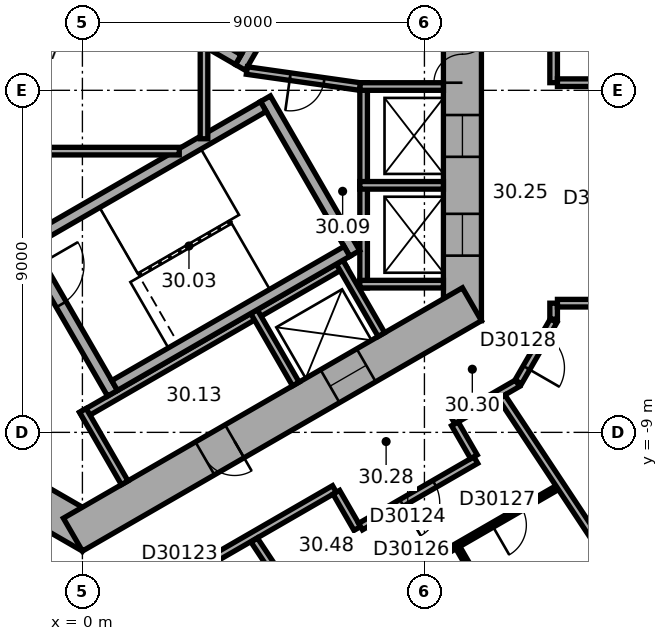
"""IFC4 building model, lengths in metres.
Left out: names, types, materials, properties, quantities, classifications, styles, units other than length and angle.
Written with IfcOpenShell. Run it as: python <this file> out.ifc"""

import sys

from ifc_helpers import new_model, si_unit, direction, frame, frame_2d, origin, place, context, subcontext, project, spatial, rectangle, extrude, element, fill, save


model = new_model("IFC4")
c1 = context("Model", 3, precision=1e-05, world=origin(), true_north=direction((0.0, 1.0)))
c2 = subcontext(c1, "Body", "Model", "MODEL_VIEW")
j1 = project(units=[si_unit("LENGTHUNIT", "METRE"), si_unit("PLANEANGLEUNIT", "RADIAN")], contexts=[c1])
p1 = place(None, origin())
s1 = spatial("IfcSite", under=j1, at=p1, CompositionType="ELEMENT")
p2 = place(p1, origin())
s2 = spatial("IfcBuilding", under=s1, at=p2, CompositionType="ELEMENT")
p3 = place(p2, frame((0.0, 0.0, 124.4)))
s3 = spatial("IfcBuildingStorey", under=s2, at=p3, CompositionType="ELEMENT", Elevation=124.4)
p4 = place(p3, frame((10.0, -6.062, 0.0), z_axis=(0.0, 0.0, 1.0), x_axis=(0.0, 1.0, 0.0)))
e1 = element("IfcWall", 1, at=p4, inside=s3, PredefinedType="SHEAR", context=c2, shape_type="SweptSolid", body=[
    extrude(rectangle(XDim=12.125, YDim=1.0, at=frame_2d((6.062, 0.0))), origin(), (0.0, 0.0, 1.0), 3.7),
])
p5 = place(p4, frame((6.262, 0.0, 0.0)))
e2 = element("IfcOpeningElement", 2, at=p5, cuts=e1, PredefinedType="OPENING", context=c2, shape_type="SweptSolid", body=[
    extrude(rectangle(XDim=1.5, YDim=2.1, at=frame_2d((0.75, 1.05))), frame((0.0, 0.51, 0.0), z_axis=(0.0, -1.0, 0.0), x_axis=(1.0, 0.0, 0.0)), (0.0, 0.0, 1.0), 1.02),
])
p6 = place(p4, frame((1.712, 0.0, 0.0)))
e3 = element("IfcOpeningElement", 3, at=p6, cuts=e1, PredefinedType="OPENING", context=c2, shape_type="SweptSolid", body=[
    extrude(rectangle(XDim=1.1, YDim=2.1, at=frame_2d((0.55, 1.05))), frame((0.0, 0.51, 0.0), z_axis=(0.0, -1.0, 0.0), x_axis=(1.0, 0.0, 0.0)), (0.0, 0.0, 1.0), 1.02),
])
p7 = place(p4, frame((4.312, 0.0, 0.0)))
e4 = element("IfcOpeningElement", 4, at=p7, cuts=e1, PredefinedType="OPENING", context=c2, shape_type="SweptSolid", body=[
    extrude(rectangle(XDim=1.1, YDim=2.1, at=frame_2d((0.55, 1.05))), frame((0.0, 0.51, 0.0), z_axis=(0.0, -1.0, 0.0), x_axis=(1.0, 0.0, 0.0)), (0.0, 0.0, 1.0), 1.02),
])
p8 = place(p3, frame((-10.25, -5.629, 0.0), z_axis=(0.0, 0.0, 1.0), x_axis=(0.866022616891, -0.50000482701, 0.0)))
e5 = element("IfcWall", 5, at=p8, inside=s3, PredefinedType="SHEAR", context=c2, shape_type="SweptSolid", body=[
    extrude(rectangle(XDim=12.125, YDim=1.0, at=frame_2d((6.062, 0.0))), origin(), (0.0, 0.0, 1.0), 3.7),
])
p9 = place(p8, frame((6.262, 0.0, 0.0)))
e6 = element("IfcOpeningElement", 6, at=p9, cuts=e5, PredefinedType="OPENING", context=c2, shape_type="SweptSolid", body=[
    extrude(rectangle(XDim=1.5, YDim=2.1, at=frame_2d((0.75, 1.05))), frame((0.0, 0.51, 0.0), z_axis=(0.0, -1.0, 0.0), x_axis=(1.0, 0.0, 0.0)), (0.0, 0.0, 1.0), 1.02),
])
p10 = place(p8, frame((1.812, 0.0, 0.0)))
e7 = element("IfcOpeningElement", 7, at=p10, cuts=e5, PredefinedType="OPENING", context=c2, shape_type="SweptSolid", body=[
    extrude(rectangle(XDim=0.9, YDim=2.1, at=frame_2d((0.45, 1.05))), frame((0.0, 0.51, 0.0), z_axis=(0.0, -1.0, 0.0), x_axis=(1.0, 0.0, 0.0)), (0.0, 0.0, 1.0), 1.02),
])
p11 = place(p8, frame((4.412, 0.0, 0.0)))
e8 = element("IfcOpeningElement", 8, at=p11, cuts=e5, PredefinedType="OPENING", context=c2, shape_type="SweptSolid", body=[
    extrude(rectangle(XDim=0.9, YDim=2.1, at=frame_2d((0.45, 1.05))), frame((0.0, 0.51, 0.0), z_axis=(0.0, -1.0, 0.0), x_axis=(1.0, 0.0, 0.0)), (0.0, 0.0, 1.0), 1.02),
])
p12 = place(p3, frame((-0.25, -11.691, 0.0), z_axis=(0.0, 0.0, 1.0), x_axis=(0.866022616891, 0.50000482701, 0.0)))
e9 = element("IfcWall", 9, at=p12, inside=s3, PredefinedType="SHEAR", context=c2, shape_type="SweptSolid", body=[
    extrude(rectangle(XDim=12.125, YDim=1.0, at=frame_2d((6.062, 0.0))), origin(), (0.0, 0.0, 1.0), 3.7),
])
p13 = place(p12, frame((4.012, 0.0, 0.0)))
e10 = element("IfcOpeningElement", 10, at=p13, cuts=e9, PredefinedType="OPENING", context=c2, shape_type="SweptSolid", body=[
    extrude(rectangle(XDim=0.9, YDim=2.1, at=frame_2d((0.45, 1.05))), frame((0.0, 0.51, 0.0), z_axis=(0.0, -1.0, 0.0), x_axis=(1.0, 0.0, 0.0)), (0.0, 0.0, 1.0), 1.02),
])
p14 = place(p12, frame((7.812, 0.0, 0.0)))
e11 = element("IfcOpeningElement", 11, at=p14, cuts=e9, PredefinedType="OPENING", context=c2, shape_type="SweptSolid", body=[
    extrude(rectangle(XDim=1.1, YDim=2.1, at=frame_2d((0.55, 1.05))), frame((0.0, 0.51, 0.0), z_axis=(0.0, -1.0, 0.0), x_axis=(1.0, 0.0, 0.0)), (0.0, 0.0, 1.0), 1.02),
])
p15 = place(p3, frame((7.4, -5.2, 0.0), z_axis=(0.0, 0.0, 1.0), x_axis=(0.0, 1.0, 0.0)))
e12 = element("IfcWall", 12, at=p15, inside=s3, PredefinedType="PARTITIONING", context=c2, shape_type="SweptSolid", body=[
    extrude(rectangle(XDim=5.4, YDim=0.2, at=frame_2d((2.7, 0.0))), origin(), (0.0, 0.0, 1.0), 3.42),
])
for number, where, z_axis, x_axis in (
    (13, (7.3, -5.1, 0.0), (0.0, 0.0, 1.0), (1.0, 0.0, 0.0)),
    (14, (7.3, -2.5, 0.0), (0.0, 0.0, 1.0), (1.0, 0.0, 0.0)),
    (15, (7.3, 0.1, 0.0), (0.0, 0.0, 1.0), (1.0, 0.0, 0.0)),
):
    element("IfcWall", number, at=place(p3, frame(where, z_axis=z_axis, x_axis=x_axis)), inside=s3, PredefinedType="PARTITIONING", context=c2, shape_type="SweptSolid", body=[
        extrude(rectangle(XDim=2.2, YDim=0.2, at=frame_2d((1.1, 0.0))), origin(), (0.0, 0.0, 1.0), 3.42),
    ])
p16 = place(p3, frame((-0.024, -8.559, 0.0), z_axis=(0.0, 0.0, 1.0), x_axis=(0.866026010844, 0.49999894854, 0.0)))
e16 = element("IfcWall", 16, at=p16, inside=s3, PredefinedType="PARTITIONING", context=c2, shape_type="SweptSolid", body=[
    extrude(rectangle(XDim=8.0, YDim=0.2, at=frame_2d((4.0, 0.0))), origin(), (0.0, 0.0, 1.0), 3.42),
])
for number, where, z_axis, x_axis in (
    (17, (0.013, -8.422, 0.0), (0.0, 0.0, 1.0), (0.5, -0.866, 0.0)),
    (18, (4.516, -5.822, 0.0), (0.0, 0.0, 1.0), (0.5, -0.866, 0.0)),
    (19, (6.768, -4.522, 0.0), (0.0, 0.0, 1.0), (0.5, -0.866, 0.0)),
):
    element("IfcWall", number, at=place(p3, frame(where, z_axis=z_axis, x_axis=x_axis)), inside=s3, PredefinedType="PARTITIONING", context=c2, shape_type="SweptSolid", body=[
        extrude(rectangle(XDim=2.2, YDim=0.2, at=frame_2d((1.1, 0.0))), origin(), (0.0, 0.0, 1.0), 3.42),
    ])
p17 = place(p3, frame((4.158, 0.602, 0.0), z_axis=(0.0, 0.0, 1.0), x_axis=(0.499977259774, 0.866038532462, 0.0)))
e20 = element("IfcWall", 20, at=p17, inside=s3, PredefinedType="SHEAR", context=c2, shape_type="SweptSolid", body=[
    extrude(rectangle(XDim=4.7, YDim=0.3, at=frame_2d((2.35, 0.0))), origin(), (0.0, 0.0, 1.0), 3.42),
])
p18 = place(p17, frame((0.8, 0.0, 0.0)))
e21 = element("IfcOpeningElement", 21, at=p18, cuts=e20, PredefinedType="OPENING", context=c2, shape_type="SweptSolid", body=[
    extrude(rectangle(XDim=1.2, YDim=2.1, at=frame_2d((0.6, 1.05))), frame((0.0, 0.16, 0.0), z_axis=(0.0, -1.0, 0.0), x_axis=(1.0, 0.0, 0.0)), (0.0, 0.0, 1.0), 0.32),
])
p19 = place(p3, frame((4.103, 0.807, 0.0), z_axis=(0.0, 0.0, 1.0), x_axis=(-0.866027801685, 0.499995846692, 0.0)))
e22 = element("IfcWall", 22, at=p19, inside=s3, PredefinedType="SHEAR", context=c2, shape_type="SweptSolid", body=[
    extrude(rectangle(XDim=7.06, YDim=0.3, at=frame_2d((3.53, 0.0))), origin(), (0.0, 0.0, 1.0), 3.42),
])
p20 = place(p3, frame((-1.558, -3.902, 0.0), z_axis=(0.0, 0.0, 1.0), x_axis=(0.499977259774, -0.866038532462, 0.0)))
e23 = element("IfcWall", 23, at=p20, inside=s3, PredefinedType="SHEAR", context=c2, shape_type="SweptSolid", body=[
    extrude(rectangle(XDim=4.7, YDim=0.3, at=frame_2d((2.35, 0.0))), origin(), (0.0, 0.0, 1.0), 3.42),
])
p21 = place(p20, frame((0.8, 0.0, 0.0)))
e24 = element("IfcOpeningElement", 24, at=p21, cuts=e23, PredefinedType="OPENING", context=c2, shape_type="SweptSolid", body=[
    extrude(rectangle(XDim=1.2, YDim=2.1, at=frame_2d((0.6, 1.05))), frame((0.0, 0.16, 0.0), z_axis=(0.0, -1.0, 0.0), x_axis=(1.0, 0.0, 0.0)), (0.0, 0.0, 1.0), 0.32),
])
p22 = place(p3, frame((4.816, -0.222, 0.0), z_axis=(0.0, 0.0, 1.0), x_axis=(0.499977259774, -0.866038532462, 0.0)))
e25 = element("IfcWall", 25, at=p22, inside=s3, PredefinedType="SHEAR", context=c2, shape_type="SweptSolid", body=[
    extrude(rectangle(XDim=4.7, YDim=0.3, at=frame_2d((2.35, 0.0))), origin(), (0.0, 0.0, 1.0), 3.42),
])
for number, where, z_axis, x_axis in (
    (26, (-1.353, -3.957, 0.0), (0.0, 0.0, 1.0), (0.866, 0.5, 0.0)),
    (27, (0.847, -7.767, 0.0), (0.0, 0.0, 1.0), (0.866, 0.5, 0.0)),
):
    element("IfcWall", number, at=place(p3, frame(where, z_axis=z_axis, x_axis=x_axis)), inside=s3, PredefinedType="SHEAR", context=c2, shape_type="SweptSolid", body=[
        extrude(rectangle(XDim=7.06, YDim=0.3, at=frame_2d((3.53, 0.0))), origin(), (0.0, 0.0, 1.0), 3.42),
    ])
p23 = place(p3, frame((4.327, 0.521, 0.0), z_axis=(0.0, 0.0, 1.0), x_axis=(0.990124376366, -0.14019172346, 0.0)))
e28 = element("IfcWall", 28, at=p23, inside=s3, PredefinedType="PARTITIONING", context=c2, shape_type="SweptSolid", body=[
    extrude(rectangle(XDim=3.002, YDim=0.2, at=frame_2d((1.501, 0.0))), origin(), (0.0, 0.0, 1.0), 3.42),
])
p24 = place(p23, frame((1.15, 0.0, 0.0)))
e29 = element("IfcOpeningElement", 29, at=p24, cuts=e28, PredefinedType="OPENING", context=c2, shape_type="SweptSolid", body=[
    extrude(rectangle(XDim=0.9, YDim=2.1, at=frame_2d((0.45, 1.05))), frame((0.0, 0.11, 0.0), z_axis=(0.0, -1.0, 0.0), x_axis=(1.0, 0.0, 0.0)), (0.0, 0.0, 1.0), 0.22),
])
p25 = place(p3, frame((-2.72, -1.6, 0.0), z_axis=(0.0, 0.0, 1.0), x_axis=(1.0, 0.0, 0.0)))
e30 = element("IfcWall", 30, at=p25, inside=s3, PredefinedType="PARTITIONING", context=c2, shape_type="SweptSolid", body=[
    extrude(rectangle(XDim=5.269, YDim=0.2, at=frame_2d((2.634, 0.0))), origin(), (0.0, 0.0, 1.0), 3.42),
])
p26 = place(p3, frame((3.2, -1.275, 0.0), z_axis=(0.0, 0.0, 1.0), x_axis=(0.0, 1.0, 0.0)))
e31 = element("IfcWall", 31, at=p26, inside=s3, PredefinedType="PARTITIONING", context=c2, shape_type="SweptSolid", body=[
    extrude(rectangle(XDim=2.549, YDim=0.2, at=frame_2d((1.275, 0.0))), origin(), (0.0, 0.0, 1.0), 3.42),
])
p27 = place(p3, frame((1.204, -13.623, 0.0), z_axis=(0.0, 0.0, 1.0), x_axis=(0.866031867142, 0.49998880497, 0.0)))
e32 = element("IfcWall", 32, at=p27, inside=s3, PredefinedType="PARTITIONING", context=c2, shape_type="SweptSolid", body=[
    extrude(rectangle(XDim=6.268, YDim=0.2, at=frame_2d((3.134, 0.0))), origin(), (0.0, 0.0, 1.0), 3.42),
])
p28 = place(p27, frame((1.381, 0.0, 0.0)))
e33 = element("IfcOpeningElement", 33, at=p28, cuts=e32, PredefinedType="OPENING", context=c2, shape_type="SweptSolid", body=[
    extrude(rectangle(XDim=1.0, YDim=2.1, at=frame_2d((0.5, 1.05))), frame((0.0, 0.11, 0.0), z_axis=(0.0, -1.0, 0.0), x_axis=(1.0, 0.0, 0.0)), (0.0, 0.0, 1.0), 0.22),
])
p29 = place(p3, frame((6.152, -14.116, 0.0), z_axis=(0.0, 0.0, 1.0), x_axis=(0.866026788224, 0.499997602072, 0.0)))
e34 = element("IfcWall", 34, at=p29, inside=s3, PredefinedType="PARTITIONING", context=c2, shape_type="SweptSolid", body=[
    extrude(rectangle(XDim=7.322, YDim=0.12, at=frame_2d((3.661, 0.0))), origin(), (0.0, 0.0, 1.0), 3.42),
])
p30 = place(p29, frame((0.55, 0.0, 0.0)))
e35 = element("IfcOpeningElement", 35, at=p30, cuts=e34, PredefinedType="OPENING", context=c2, shape_type="SweptSolid", body=[
    extrude(rectangle(XDim=1.0, YDim=2.1, at=frame_2d((0.5, 1.05))), frame((0.0, 0.07, 0.0), z_axis=(0.0, -1.0, 0.0), x_axis=(1.0, 0.0, 0.0)), (0.0, 0.0, 1.0), 0.14),
])
p31 = place(p29, frame((2.736, 0.0, 0.0)))
e36 = element("IfcOpeningElement", 36, at=p31, cuts=e34, PredefinedType="OPENING", context=c2, shape_type="SweptSolid", body=[
    extrude(rectangle(XDim=0.9, YDim=2.1, at=frame_2d((0.45, 1.05))), frame((0.0, 0.07, 0.0), z_axis=(0.0, -1.0, 0.0), x_axis=(1.0, 0.0, 0.0)), (0.0, 0.0, 1.0), 0.14),
])
p32 = place(p29, frame((5.347, 0.0, 0.0)))
e37 = element("IfcOpeningElement", 37, at=p32, cuts=e34, PredefinedType="OPENING", context=c2, shape_type="SweptSolid", body=[
    extrude(rectangle(XDim=0.9, YDim=2.1, at=frame_2d((0.45, 1.05))), frame((0.0, 0.07, 0.0), z_axis=(0.0, -1.0, 0.0), x_axis=(1.0, 0.0, 0.0)), (0.0, 0.0, 1.0), 0.14),
])
p33 = place(p3, frame((6.682, -10.576, 0.0), z_axis=(0.0, 0.0, 1.0), x_axis=(0.499978356969, -0.866037899034, 0.0)))
e38 = element("IfcWall", 38, at=p33, inside=s3, PredefinedType="PARTITIONING", context=c2, shape_type="SweptSolid", body=[
    extrude(rectangle(XDim=1.101, YDim=0.2, at=frame_2d((0.551, 0.0))), origin(), (0.0, 0.0, 1.0), 3.42),
])
p34 = place(p3, frame((7.319, -11.479, 0.0), z_axis=(0.0, 0.0, 1.0), x_axis=(0.866038154057, 0.49997791523, 0.0)))
e39 = element("IfcWall", 39, at=p34, inside=s3, PredefinedType="PARTITIONING", context=c2, shape_type="SweptSolid", body=[
    extrude(rectangle(XDim=3.502, YDim=0.2, at=frame_2d((1.751, 0.0))), origin(), (0.0, 0.0, 1.0), 3.42),
])
p35 = place(p34, frame((1.251, 0.0, 0.0)))
e40 = element("IfcOpeningElement", 40, at=p35, cuts=e39, PredefinedType="OPENING", context=c2, shape_type="SweptSolid", body=[
    extrude(rectangle(XDim=1.0, YDim=2.1, at=frame_2d((0.5, 1.05))), frame((0.0, 0.11, 0.0), z_axis=(0.0, -1.0, 0.0), x_axis=(1.0, 0.0, 0.0)), (0.0, 0.0, 1.0), 0.22),
])
p36 = place(p3, frame((9.15, -18.827, 0.0), z_axis=(0.0, 0.0, 1.0), x_axis=(-0.551942527453, 0.833882153777, 0.0)))
e41 = element("IfcWall", 41, at=p36, inside=s3, PredefinedType="PARTITIONING", context=c2, shape_type="SweptSolid", body=[
    extrude(rectangle(XDim=8.386, YDim=0.2, at=frame_2d((4.193, 0.0))), origin(), (0.0, 0.0, 1.0), 2.87),
])
p37 = place(p3, frame((9.752, -8.688, 0.0), z_axis=(0.0, 0.0, 1.0), x_axis=(0.865974105138, 0.500088841337, 0.0)))
e42 = element("IfcWall", 42, at=p37, inside=s3, PredefinedType="PARTITIONING", context=c2, shape_type="SweptSolid", body=[
    extrude(rectangle(XDim=1.961, YDim=0.2, at=frame_2d((0.98, 0.0))), origin(), (0.0, 0.0, 1.0), 3.42),
])
p38 = place(p3, frame((10.302, -9.642, 0.0), z_axis=(0.0, 0.0, 1.0), x_axis=(-0.500074377092, 0.865982457891, 0.0)))
e43 = element("IfcWall", 43, at=p38, inside=s3, PredefinedType="PARTITIONING", context=c2, shape_type="SweptSolid", body=[
    extrude(rectangle(XDim=1.001, YDim=0.2, at=frame_2d((0.5, 0.0))), origin(), (0.0, 0.0, 1.0), 3.42),
])
p39 = place(p3, frame((11.47, -7.673, 0.0), z_axis=(0.0, 0.0, 1.0), x_axis=(0.499964847546, 0.866045698112, 0.0)))
e44 = element("IfcWall", 44, at=p39, inside=s3, PredefinedType="PARTITIONING", context=c2, shape_type="SweptSolid", body=[
    extrude(rectangle(XDim=1.86, YDim=0.2, at=frame_2d((0.93, 0.0))), origin(), (0.0, 0.0, 1.0), 3.42),
])
p40 = place(p39, frame((0.43, 0.0, 0.0)))
e45 = element("IfcOpeningElement", 45, at=p40, cuts=e44, PredefinedType="OPENING", context=c2, shape_type="SweptSolid", body=[
    extrude(rectangle(XDim=1.0, YDim=2.1, at=frame_2d((0.5, 1.05))), frame((0.0, 0.11, 0.0), z_axis=(0.0, -1.0, 0.0), x_axis=(1.0, 0.0, 0.0)), (0.0, 0.0, 1.0), 0.22),
])
p41 = place(p3, frame((12.4, -6.022, 0.0), z_axis=(0.0, 0.0, 1.0), x_axis=(0.0, 1.0, 0.0)))
e46 = element("IfcWall", 46, at=p41, inside=s3, PredefinedType="PARTITIONING", context=c2, shape_type="SweptSolid", body=[
    extrude(rectangle(XDim=0.421, YDim=0.2, at=frame_2d((0.21, 0.0))), origin(), (0.0, 0.0, 1.0), 3.42),
])
p42 = place(p3, frame((12.4, 0.201, 0.0), z_axis=(0.0, 0.0, 1.0), x_axis=(0.0, 1.0, 0.0)))
e47 = element("IfcWall", 47, at=p42, inside=s3, PredefinedType="PARTITIONING", context=c2, shape_type="SweptSolid", body=[
    extrude(rectangle(XDim=5.861, YDim=0.2, at=frame_2d((2.931, 0.0))), origin(), (0.0, 0.0, 1.0), 3.42),
])
p43 = place(p42, frame((1.306, 0.0, 0.0)))
e48 = element("IfcOpeningElement", 48, at=p43, cuts=e47, PredefinedType="OPENING", context=c2, shape_type="SweptSolid", body=[
    extrude(rectangle(XDim=1.0, YDim=2.1, at=frame_2d((0.5, 1.05))), frame((0.0, 0.11, 0.0), z_axis=(0.0, -1.0, 0.0), x_axis=(1.0, 0.0, 0.0)), (0.0, 0.0, 1.0), 0.22),
])
p44 = place(p3, frame((12.5, -5.601, 0.0), z_axis=(0.0, 0.0, 1.0), x_axis=(1.0, 0.0, 0.0)))
e49 = element("IfcWall", 49, at=p44, inside=s3, PredefinedType="PARTITIONING", context=c2, shape_type="SweptSolid", body=[
    extrude(rectangle(XDim=1.101, YDim=0.2, at=frame_2d((0.551, 0.0))), origin(), (0.0, 0.0, 1.0), 3.42),
])
p45 = place(p3, frame((12.517, -16.599, 0.0), z_axis=(0.0, 0.0, 1.0), x_axis=(-0.500013727357, 0.866017478146, 0.0)))
e50 = element("IfcWall", 50, at=p45, inside=s3, PredefinedType="PARTITIONING", context=c2, shape_type="SweptSolid", body=[
    extrude(rectangle(XDim=5.272, YDim=0.12, at=frame_2d((2.636, 0.0))), origin(), (0.0, 0.0, 1.0), 3.42),
])
p46 = place(p3, frame((13.501, 0.201, 0.0), z_axis=(0.0, 0.0, 1.0), x_axis=(-1.0, 0.0, 0.0)))
e51 = element("IfcWall", 51, at=p46, inside=s3, PredefinedType="PARTITIONING", context=c2, shape_type="SweptSolid", body=[
    extrude(rectangle(XDim=1.001, YDim=0.2, at=frame_2d((0.5, 0.0))), origin(), (0.0, 0.0, 1.0), 3.42),
])
p47 = place(p3, frame((15.411, -14.683, 0.0), z_axis=(0.0, 0.0, 1.0), x_axis=(-0.551932106251, 0.833889051427, 0.0)))
e52 = element("IfcWall", 52, at=p47, inside=s3, PredefinedType="PARTITIONING", context=c2, shape_type="SweptSolid", body=[
    extrude(rectangle(XDim=7.926, YDim=0.2, at=frame_2d((3.963, 0.0))), origin(), (0.0, 0.0, 1.0), 2.87),
])
p48 = place(p5, origin())
e53 = element("IfcDoor", 53, at=p48, inside=s3, OperationType="DOUBLE_DOOR_SINGLE_SWING", PredefinedType="DOOR", context=c2, shape_type="SweptSolid", body=[
    extrude(rectangle(XDim=1.5, YDim=2.1, at=frame_2d((0.75, 1.05))), frame((0.0, 0.025, 0.0), z_axis=(0.0, -1.0, 0.0), x_axis=(1.0, 0.0, 0.0)), (0.0, 0.0, 1.0), 0.05),
])
fill(e2, e53)
p49 = place(p21, origin())
e54 = element("IfcDoor", 54, at=p49, inside=s3, OperationType="SINGLE_SWING_RIGHT", PredefinedType="DOOR", context=c2, shape_type="SweptSolid", body=[
    extrude(rectangle(XDim=1.2, YDim=2.1, at=frame_2d((0.6, 1.05))), frame((0.0, 0.025, 0.0), z_axis=(0.0, -1.0, 0.0), x_axis=(1.0, 0.0, 0.0)), (0.0, 0.0, 1.0), 0.05),
])
fill(e24, e54)
p50 = place(p24, origin())
e55 = element("IfcDoor", 55, at=p50, inside=s3, OperationType="SINGLE_SWING_LEFT", PredefinedType="DOOR", context=c2, shape_type="SweptSolid", body=[
    extrude(rectangle(XDim=0.9, YDim=2.1, at=frame_2d((0.45, 1.05))), frame((0.0, 0.025, 0.0), z_axis=(0.0, -1.0, 0.0), x_axis=(1.0, 0.0, 0.0)), (0.0, 0.0, 1.0), 0.05),
])
fill(e29, e55)
p51 = place(p13, origin())
e56 = element("IfcDoor", 56, at=p51, inside=s3, OperationType="SINGLE_SWING_LEFT", PredefinedType="DOOR", context=c2, shape_type="SweptSolid", body=[
    extrude(rectangle(XDim=0.9, YDim=2.1, at=frame_2d((0.45, 1.05))), frame((0.0, 0.025, 0.0), z_axis=(0.0, -1.0, 0.0), x_axis=(1.0, 0.0, 0.0)), (0.0, 0.0, 1.0), 0.05),
])
fill(e10, e56)
p52 = place(p6, origin())
e57 = element("IfcDoor", 57, at=p52, inside=s3, OperationType="DOUBLE_DOOR_SLIDING", PredefinedType="DOOR", context=c2, shape_type="SweptSolid", body=[
    extrude(rectangle(XDim=1.1, YDim=2.1, at=frame_2d((0.55, 1.05))), frame((0.0, 0.025, 0.0), z_axis=(0.0, -1.0, 0.0), x_axis=(1.0, 0.0, 0.0)), (0.0, 0.0, 1.0), 0.05),
])
fill(e3, e57)
p53 = place(p7, origin())
e58 = element("IfcDoor", 58, at=p53, inside=s3, OperationType="DOUBLE_DOOR_SLIDING", PredefinedType="DOOR", context=c2, shape_type="SweptSolid", body=[
    extrude(rectangle(XDim=1.1, YDim=2.1, at=frame_2d((0.55, 1.05))), frame((0.0, 0.025, 0.0), z_axis=(0.0, -1.0, 0.0), x_axis=(1.0, 0.0, 0.0)), (0.0, 0.0, 1.0), 0.05),
])
fill(e4, e58)
p54 = place(p14, origin())
e59 = element("IfcDoor", 59, at=p54, inside=s3, OperationType="DOUBLE_DOOR_SLIDING", PredefinedType="DOOR", context=c2, shape_type="SweptSolid", body=[
    extrude(rectangle(XDim=1.1, YDim=2.1, at=frame_2d((0.55, 1.05))), frame((0.0, 0.025, 0.0), z_axis=(0.0, -1.0, 0.0), x_axis=(1.0, 0.0, 0.0)), (0.0, 0.0, 1.0), 0.05),
])
fill(e11, e59)
p55 = place(p35, origin())
e60 = element("IfcDoor", 60, at=p55, inside=s3, OperationType="SINGLE_SWING_LEFT", PredefinedType="DOOR", context=c2, shape_type="SweptSolid", body=[
    extrude(rectangle(XDim=1.0, YDim=2.1, at=frame_2d((0.5, 1.05))), frame((0.0, 0.025, 0.0), z_axis=(0.0, -1.0, 0.0), x_axis=(1.0, 0.0, 0.0)), (0.0, 0.0, 1.0), 0.05),
])
fill(e40, e60)
p56 = place(p31, origin())
e61 = element("IfcDoor", 61, at=p56, inside=s3, OperationType="SINGLE_SWING_LEFT", PredefinedType="DOOR", context=c2, shape_type="SweptSolid", body=[
    extrude(rectangle(XDim=0.9, YDim=2.1, at=frame_2d((0.45, 1.05))), frame((0.0, 0.025, 0.0), z_axis=(0.0, -1.0, 0.0), x_axis=(1.0, 0.0, 0.0)), (0.0, 0.0, 1.0), 0.05),
])
fill(e36, e61)
p57 = place(p32, origin())
e62 = element("IfcDoor", 62, at=p57, inside=s3, OperationType="SINGLE_SWING_LEFT", PredefinedType="DOOR", context=c2, shape_type="SweptSolid", body=[
    extrude(rectangle(XDim=0.9, YDim=2.1, at=frame_2d((0.45, 1.05))), frame((0.0, 0.025, 0.0), z_axis=(0.0, -1.0, 0.0), x_axis=(1.0, 0.0, 0.0)), (0.0, 0.0, 1.0), 0.05),
])
fill(e37, e62)
p58 = place(p40, origin())
e63 = element("IfcDoor", 63, at=p58, inside=s3, OperationType="SINGLE_SWING_LEFT", PredefinedType="DOOR", context=c2, shape_type="SweptSolid", body=[
    extrude(rectangle(XDim=1.0, YDim=2.1, at=frame_2d((0.5, 1.05))), frame((0.0, 0.025, 0.0), z_axis=(0.0, -1.0, 0.0), x_axis=(1.0, 0.0, 0.0)), (0.0, 0.0, 1.0), 0.05),
])
fill(e45, e63)
save(model, sys.argv[1])
